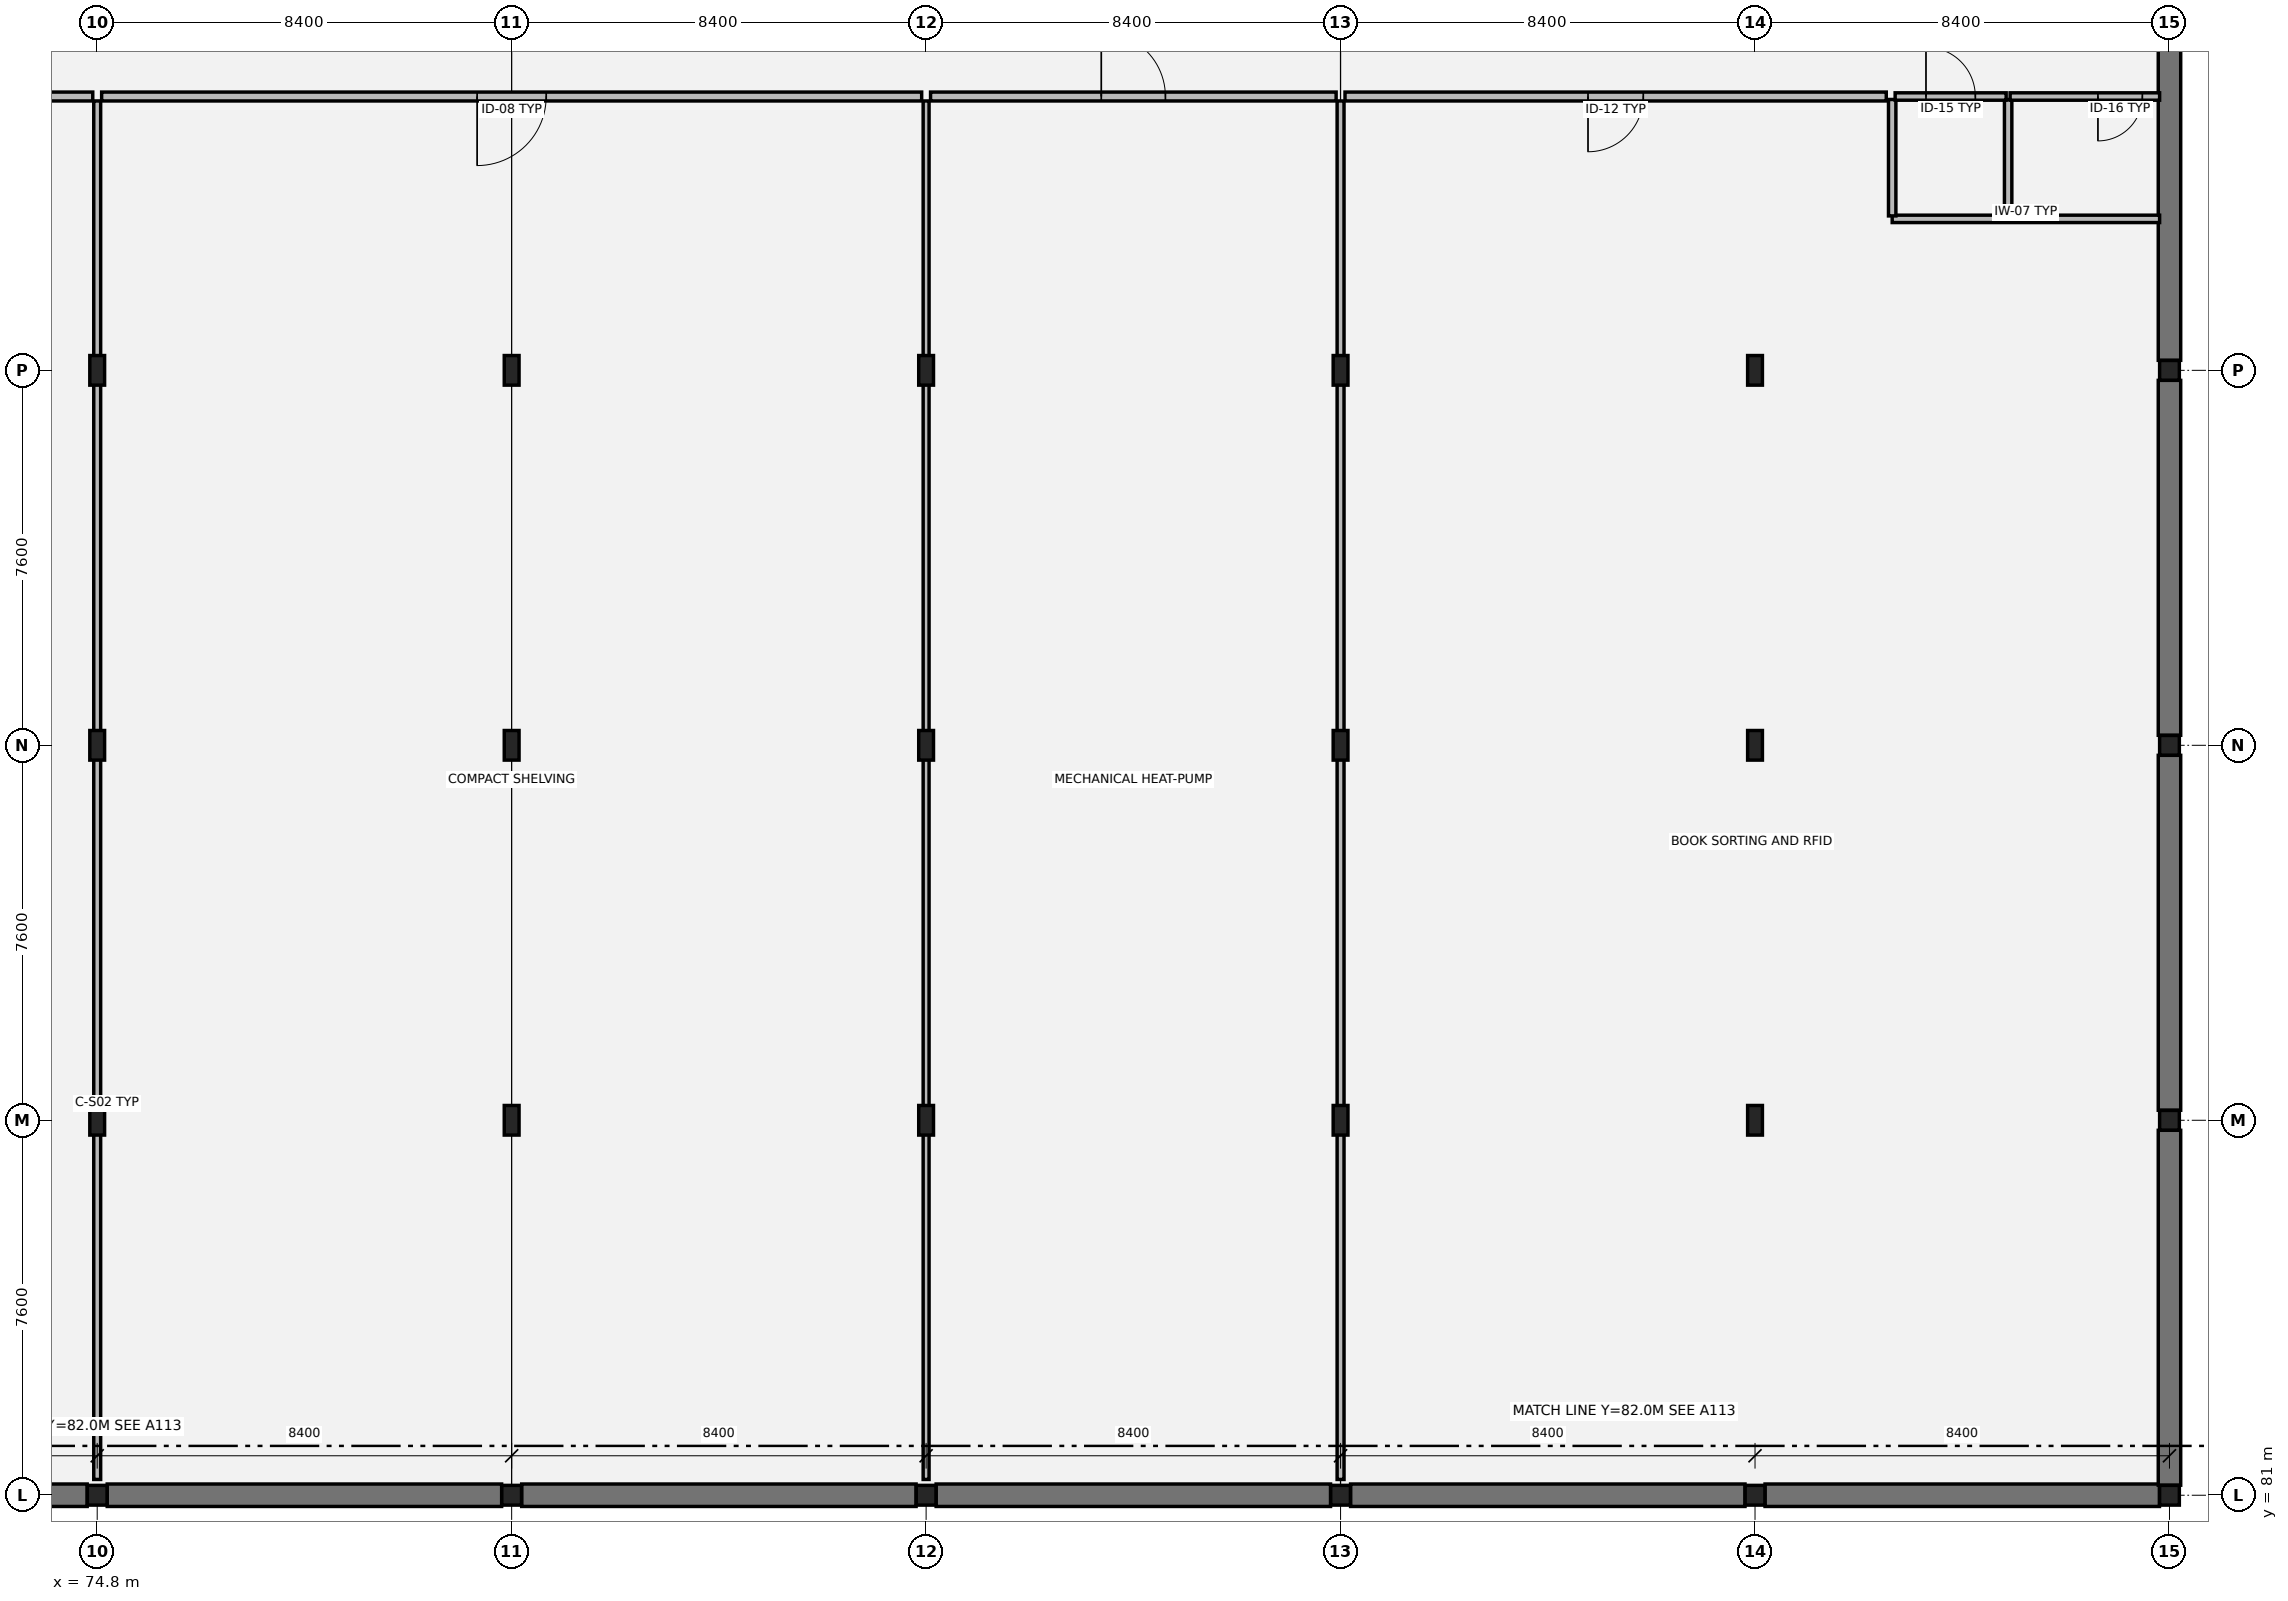
"""IFC4 building model, lengths in metres.
Left out: names, types, materials, properties, quantities, classifications, styles, units other than length and angle.
Written with IfcOpenShell. Run it as: python <this file> out.ifc"""

import sys

from ifc_helpers import new_model, si_unit, direction, frame, frame_2d, origin, origin_2d, place, context, subcontext, project, spatial, rectangle, hollow_rectangle, i_section, extrude, element, fill, save


model = new_model("IFC4")
c1 = context("Model", 3, precision=1e-05, world=origin(), true_north=direction((0.0, 1.0)))
c2 = subcontext(c1, "Body", "Model", "MODEL_VIEW")
j1 = project(units=[si_unit("LENGTHUNIT", "METRE"), si_unit("PLANEANGLEUNIT", "RADIAN")], contexts=[c1])
p1 = place(None, origin())
s1 = spatial("IfcSite", under=j1, at=p1, CompositionType="ELEMENT")
p2 = place(p1, origin())
s2 = spatial("IfcBuilding", under=s1, at=p2, CompositionType="ELEMENT")
p3 = place(p2, frame((0.0, 0.0, -4.42)))
s3 = spatial("IfcBuildingStorey", under=s2, at=p3, CompositionType="ELEMENT", Elevation=-4.42)
p4 = place(p3, frame((74.8, 81.0, 0.0), z_axis=(0.0, 0.0, 1.0), x_axis=(1.0, 0.0, 0.0)))
e1 = element("IfcColumn", 1, at=p4, inside=s3, PredefinedType="COLUMN", context=c2, shape_type="SweptSolid", body=[
    extrude(hollow_rectangle(XDim=0.4, YDim=0.4, WallThickness=0.016, at=origin_2d()), origin(), (0.0, 0.0, 1.0), 4.395),
])
for number, where, z_axis, x_axis in (
    (2, (74.8, 88.6, 0.0), (0.0, 0.0, 1.0), (1.0, 0.0, 0.0)),
    (3, (74.8, 96.2, 0.0), (0.0, 0.0, 1.0), (1.0, 0.0, 0.0)),
    (4, (74.8, 103.8, 0.0), (0.0, 0.0, 1.0), (1.0, 0.0, 0.0)),
):
    element("IfcColumn", number, at=place(p3, frame(where, z_axis=z_axis, x_axis=x_axis)), inside=s3, PredefinedType="COLUMN", context=c2, shape_type="SweptSolid", body=[
        extrude(i_section(OverallWidth=0.3, OverallDepth=0.6, WebThickness=0.015, FlangeThickness=0.03, at=origin_2d()), origin(), (0.0, 0.0, 1.0), 4.395),
    ])
p5 = place(p3, frame((83.2, 81.0, 0.0), z_axis=(0.0, 0.0, 1.0), x_axis=(1.0, 0.0, 0.0)))
e5 = element("IfcColumn", 5, at=p5, inside=s3, PredefinedType="COLUMN", context=c2, shape_type="SweptSolid", body=[
    extrude(hollow_rectangle(XDim=0.4, YDim=0.4, WallThickness=0.016, at=origin_2d()), origin(), (0.0, 0.0, 1.0), 4.395),
])
for number, where, z_axis, x_axis in (
    (6, (83.2, 88.6, 0.0), (0.0, 0.0, 1.0), (1.0, 0.0, 0.0)),
    (7, (83.2, 96.2, 0.0), (0.0, 0.0, 1.0), (1.0, 0.0, 0.0)),
    (8, (83.2, 103.8, 0.0), (0.0, 0.0, 1.0), (1.0, 0.0, 0.0)),
):
    element("IfcColumn", number, at=place(p3, frame(where, z_axis=z_axis, x_axis=x_axis)), inside=s3, PredefinedType="COLUMN", context=c2, shape_type="SweptSolid", body=[
        extrude(i_section(OverallWidth=0.3, OverallDepth=0.6, WebThickness=0.015, FlangeThickness=0.03, at=origin_2d()), origin(), (0.0, 0.0, 1.0), 4.395),
    ])
p6 = place(p3, frame((91.6, 81.0, 0.0), z_axis=(0.0, 0.0, 1.0), x_axis=(1.0, 0.0, 0.0)))
e9 = element("IfcColumn", 9, at=p6, inside=s3, PredefinedType="COLUMN", context=c2, shape_type="SweptSolid", body=[
    extrude(hollow_rectangle(XDim=0.4, YDim=0.4, WallThickness=0.016, at=origin_2d()), origin(), (0.0, 0.0, 1.0), 4.395),
])
for number, where, z_axis, x_axis in (
    (10, (91.6, 88.6, 0.0), (0.0, 0.0, 1.0), (1.0, 0.0, 0.0)),
    (11, (91.6, 96.2, 0.0), (0.0, 0.0, 1.0), (1.0, 0.0, 0.0)),
    (12, (91.6, 103.8, 0.0), (0.0, 0.0, 1.0), (1.0, 0.0, 0.0)),
):
    element("IfcColumn", number, at=place(p3, frame(where, z_axis=z_axis, x_axis=x_axis)), inside=s3, PredefinedType="COLUMN", context=c2, shape_type="SweptSolid", body=[
        extrude(i_section(OverallWidth=0.3, OverallDepth=0.6, WebThickness=0.015, FlangeThickness=0.03, at=origin_2d()), origin(), (0.0, 0.0, 1.0), 4.395),
    ])
p7 = place(p3, frame((100.0, 81.0, 0.0), z_axis=(0.0, 0.0, 1.0), x_axis=(1.0, 0.0, 0.0)))
e13 = element("IfcColumn", 13, at=p7, inside=s3, PredefinedType="COLUMN", context=c2, shape_type="SweptSolid", body=[
    extrude(hollow_rectangle(XDim=0.4, YDim=0.4, WallThickness=0.016, at=origin_2d()), origin(), (0.0, 0.0, 1.0), 4.395),
])
for number, where, z_axis, x_axis in (
    (14, (100.0, 88.6, 0.0), (0.0, 0.0, 1.0), (1.0, 0.0, 0.0)),
    (15, (100.0, 96.2, 0.0), (0.0, 0.0, 1.0), (1.0, 0.0, 0.0)),
    (16, (100.0, 103.8, 0.0), (0.0, 0.0, 1.0), (1.0, 0.0, 0.0)),
):
    element("IfcColumn", number, at=place(p3, frame(where, z_axis=z_axis, x_axis=x_axis)), inside=s3, PredefinedType="COLUMN", context=c2, shape_type="SweptSolid", body=[
        extrude(i_section(OverallWidth=0.3, OverallDepth=0.6, WebThickness=0.015, FlangeThickness=0.03, at=origin_2d()), origin(), (0.0, 0.0, 1.0), 4.395),
    ])
p8 = place(p3, frame((108.4, 81.0, 0.0), z_axis=(0.0, 0.0, 1.0), x_axis=(1.0, 0.0, 0.0)))
e17 = element("IfcColumn", 17, at=p8, inside=s3, PredefinedType="COLUMN", context=c2, shape_type="SweptSolid", body=[
    extrude(hollow_rectangle(XDim=0.4, YDim=0.4, WallThickness=0.016, at=origin_2d()), origin(), (0.0, 0.0, 1.0), 4.395),
])
for number, where, z_axis, x_axis in (
    (18, (108.4, 88.6, 0.0), (0.0, 0.0, 1.0), (1.0, 0.0, 0.0)),
    (19, (108.4, 96.2, 0.0), (0.0, 0.0, 1.0), (1.0, 0.0, 0.0)),
    (20, (108.4, 103.8, 0.0), (0.0, 0.0, 1.0), (1.0, 0.0, 0.0)),
):
    element("IfcColumn", number, at=place(p3, frame(where, z_axis=z_axis, x_axis=x_axis)), inside=s3, PredefinedType="COLUMN", context=c2, shape_type="SweptSolid", body=[
        extrude(i_section(OverallWidth=0.3, OverallDepth=0.6, WebThickness=0.015, FlangeThickness=0.03, at=origin_2d()), origin(), (0.0, 0.0, 1.0), 4.395),
    ])
for number, where, z_axis, x_axis in (
    (21, (116.8, 81.0, 0.0), (0.0, 0.0, 1.0), (1.0, 0.0, 0.0)),
    (22, (116.8, 88.6, 0.0), (0.0, 0.0, 1.0), (1.0, 0.0, 0.0)),
    (23, (116.8, 96.2, 0.0), (0.0, 0.0, 1.0), (1.0, 0.0, 0.0)),
    (24, (116.8, 103.8, 0.0), (0.0, 0.0, 1.0), (1.0, 0.0, 0.0)),
):
    element("IfcColumn", number, at=place(p3, frame(where, z_axis=z_axis, x_axis=x_axis)), inside=s3, PredefinedType="COLUMN", context=c2, shape_type="SweptSolid", body=[
        extrude(hollow_rectangle(XDim=0.4, YDim=0.4, WallThickness=0.016, at=origin_2d()), origin(), (0.0, 0.0, 1.0), 4.395),
    ])
p9 = place(p3, frame((66.603, 81.0, 0.0), z_axis=(0.0, 0.0, 1.0), x_axis=(1.0, 0.0, 0.0)))
e25 = element("IfcWall", 25, at=p9, inside=s3, PredefinedType="USERDEFINED", context=c2, shape_type="SweptSolid", body=[
    extrude(rectangle(XDim=7.994, YDim=0.455, at=frame_2d((3.997, 0.0))), origin(), (0.0, 0.0, 1.0), 3.82),
])
p10 = place(p3, frame((75.003, 81.0, 0.0), z_axis=(0.0, 0.0, 1.0), x_axis=(1.0, 0.0, 0.0)))
e26 = element("IfcWall", 26, at=p10, inside=s3, PredefinedType="USERDEFINED", context=c2, shape_type="SweptSolid", body=[
    extrude(rectangle(XDim=7.994, YDim=0.455, at=frame_2d((3.997, 0.0))), origin(), (0.0, 0.0, 1.0), 3.82),
])
p11 = place(p3, frame((83.403, 81.0, 0.0), z_axis=(0.0, 0.0, 1.0), x_axis=(1.0, 0.0, 0.0)))
e27 = element("IfcWall", 27, at=p11, inside=s3, PredefinedType="USERDEFINED", context=c2, shape_type="SweptSolid", body=[
    extrude(rectangle(XDim=7.994, YDim=0.455, at=frame_2d((3.997, 0.0))), origin(), (0.0, 0.0, 1.0), 3.82),
])
for number, where, z_axis, x_axis in (
    (28, (91.803, 81.0, 0.0), (0.0, 0.0, 1.0), (1.0, 0.0, 0.0)),
    (29, (100.203, 81.0, 0.0), (0.0, 0.0, 1.0), (1.0, 0.0, 0.0)),
):
    element("IfcWall", number, at=place(p3, frame(where, z_axis=z_axis, x_axis=x_axis)), inside=s3, PredefinedType="USERDEFINED", context=c2, shape_type="SweptSolid", body=[
        extrude(rectangle(XDim=7.994, YDim=0.455, at=frame_2d((3.997, 0.0))), origin(), (0.0, 0.0, 1.0), 3.82),
    ])
p12 = place(p3, frame((108.603, 81.0, 0.0), z_axis=(0.0, 0.0, 1.0), x_axis=(1.0, 0.0, 0.0)))
e30 = element("IfcWall", 30, at=p12, inside=s3, PredefinedType="USERDEFINED", context=c2, shape_type="SweptSolid", body=[
    extrude(rectangle(XDim=7.994, YDim=0.455, at=frame_2d((3.997, 0.0))), origin(), (0.0, 0.0, 1.0), 3.82),
])
for number, where, z_axis, x_axis in (
    (31, (116.8, 81.203, 0.0), (0.0, 0.0, 1.0), (0.0, 1.0, 0.0)),
    (32, (116.8, 88.803, 0.0), (0.0, 0.0, 1.0), (0.0, 1.0, 0.0)),
):
    element("IfcWall", number, at=place(p3, frame(where, z_axis=z_axis, x_axis=x_axis)), inside=s3, PredefinedType="USERDEFINED", context=c2, shape_type="SweptSolid", body=[
        extrude(rectangle(XDim=7.194, YDim=0.455, at=frame_2d((3.597, 0.0))), origin(), (0.0, 0.0, 1.0), 3.82),
    ])
p13 = place(p3, frame((116.8, 96.403, 0.0), z_axis=(0.0, 0.0, 1.0), x_axis=(0.0, 1.0, 0.0)))
e33 = element("IfcWall", 33, at=p13, inside=s3, PredefinedType="USERDEFINED", context=c2, shape_type="SweptSolid", body=[
    extrude(rectangle(XDim=7.194, YDim=0.455, at=frame_2d((3.597, 0.0))), origin(), (0.0, 0.0, 1.0), 3.82),
])
p14 = place(p3, frame((116.8, 104.003, 0.0), z_axis=(0.0, 0.0, 1.0), x_axis=(0.0, 1.0, 0.0)))
e34 = element("IfcWall", 34, at=p14, inside=s3, PredefinedType="USERDEFINED", context=c2, shape_type="SweptSolid", body=[
    extrude(rectangle(XDim=7.194, YDim=0.455, at=frame_2d((3.597, 0.0))), origin(), (0.0, 0.0, 1.0), 3.82),
])
p15 = place(p3, frame((111.18, 106.87, 0.0), z_axis=(0.0, 0.0, 1.0), x_axis=(1.0, 0.0, 0.0)))
e35 = element("IfcWall", 35, at=p15, inside=s3, PredefinedType="PARTITIONING", context=c2, shape_type="SweptSolid", body=[
    extrude(rectangle(XDim=5.42, YDim=0.15, at=frame_2d((2.71, 0.0))), origin(), (0.0, 0.0, 1.0), 3.52),
])
for number, where, z_axis, x_axis in (
    (36, (111.18, 106.93, 0.0), (0.0, 0.0, 1.0), (0.0, 1.0, 0.0)),
    (37, (113.53, 106.93, 0.0), (0.0, 0.0, 1.0), (0.0, 1.0, 0.0)),
):
    element("IfcWall", number, at=place(p3, frame(where, z_axis=z_axis, x_axis=x_axis)), inside=s3, PredefinedType="PARTITIONING", context=c2, shape_type="SweptSolid", body=[
        extrude(rectangle(XDim=2.36, YDim=0.15, at=frame_2d((1.18, 0.0))), origin(), (0.0, 0.0, 1.0), 3.52),
    ])
p16 = place(p3, frame((111.24, 109.35, 0.0), z_axis=(0.0, 0.0, 1.0), x_axis=(1.0, 0.0, 0.0)))
e38 = element("IfcWall", 38, at=p16, inside=s3, PredefinedType="PARTITIONING", context=c2, shape_type="SweptSolid", body=[
    extrude(rectangle(XDim=2.25, YDim=0.15, at=frame_2d((1.125, 0.0))), origin(), (0.0, 0.0, 1.0), 3.52),
])
p17 = place(p16, frame((0.625, 0.0, 0.0)))
e39 = element("IfcOpeningElement", 39, at=p17, cuts=e38, PredefinedType="OPENING", context=c2, shape_type="SweptSolid", body=[
    extrude(rectangle(XDim=1.0, YDim=2.15, at=frame_2d((0.5, 1.075))), frame((0.0, 0.085, 0.0), z_axis=(0.0, -1.0, 0.0), x_axis=(1.0, 0.0, 0.0)), (0.0, 0.0, 1.0), 0.17),
])
p18 = place(p3, frame((113.57, 109.35, 0.0), z_axis=(0.0, 0.0, 1.0), x_axis=(1.0, 0.0, 0.0)))
e40 = element("IfcWall", 40, at=p18, inside=s3, PredefinedType="PARTITIONING", context=c2, shape_type="SweptSolid", body=[
    extrude(rectangle(XDim=3.03, YDim=0.15, at=frame_2d((1.515, 0.0))), origin(), (0.0, 0.0, 1.0), 3.52),
])
p19 = place(p18, frame((1.78, 0.0, 0.0)))
e41 = element("IfcOpeningElement", 41, at=p19, cuts=e40, PredefinedType="OPENING", context=c2, shape_type="SweptSolid", body=[
    extrude(rectangle(XDim=0.9, YDim=2.15, at=frame_2d((0.45, 1.075))), frame((0.0, 0.085, 0.0), z_axis=(0.0, -1.0, 0.0), x_axis=(1.0, 0.0, 0.0)), (0.0, 0.0, 1.0), 0.17),
])
p20 = place(p3, frame((66.6, 109.35, 0.0), z_axis=(0.0, 0.0, 1.0), x_axis=(1.0, 0.0, 0.0)))
e42 = element("IfcWall", 42, at=p20, inside=s3, PredefinedType="PARTITIONING", context=c2, shape_type="SweptSolid", body=[
    extrude(rectangle(XDim=8.11, YDim=0.18, at=frame_2d((4.055, 0.0))), origin(), (0.0, 0.0, 1.0), 3.52),
])
p21 = place(p20, frame((3.405, 0.0, 0.0)))
e43 = element("IfcOpeningElement", 43, at=p21, cuts=e42, PredefinedType="OPENING", context=c2, shape_type="SweptSolid", body=[
    extrude(rectangle(XDim=1.3, YDim=2.2, at=frame_2d((0.65, 1.1))), frame((0.0, 0.1, 0.0), z_axis=(0.0, -1.0, 0.0), x_axis=(1.0, 0.0, 0.0)), (0.0, 0.0, 1.0), 0.2),
])
p22 = place(p3, frame((74.89, 109.35, 0.0), z_axis=(0.0, 0.0, 1.0), x_axis=(1.0, 0.0, 0.0)))
e44 = element("IfcWall", 44, at=p22, inside=s3, PredefinedType="PARTITIONING", context=c2, shape_type="SweptSolid", body=[
    extrude(rectangle(XDim=16.62, YDim=0.18, at=frame_2d((8.31, 0.0))), origin(), (0.0, 0.0, 1.0), 3.52),
])
p23 = place(p22, frame((7.61, 0.0, 0.0)))
e45 = element("IfcOpeningElement", 45, at=p23, cuts=e44, PredefinedType="OPENING", context=c2, shape_type="SweptSolid", body=[
    extrude(rectangle(XDim=1.4, YDim=2.22, at=frame_2d((0.7, 1.11))), frame((0.0, 0.1, 0.0), z_axis=(0.0, -1.0, 0.0), x_axis=(1.0, 0.0, 0.0)), (0.0, 0.0, 1.0), 0.2),
])
p24 = place(p3, frame((91.69, 109.35, 0.0), z_axis=(0.0, 0.0, 1.0), x_axis=(1.0, 0.0, 0.0)))
e46 = element("IfcWall", 46, at=p24, inside=s3, PredefinedType="PARTITIONING", context=c2, shape_type="SweptSolid", body=[
    extrude(rectangle(XDim=8.22, YDim=0.18, at=frame_2d((4.11, 0.0))), origin(), (0.0, 0.0, 1.0), 3.52),
])
p25 = place(p24, frame((3.46, 0.0, 0.0)))
e47 = element("IfcOpeningElement", 47, at=p25, cuts=e46, PredefinedType="OPENING", context=c2, shape_type="SweptSolid", body=[
    extrude(rectangle(XDim=1.3, YDim=2.2, at=frame_2d((0.65, 1.1))), frame((0.0, 0.1, 0.0), z_axis=(0.0, -1.0, 0.0), x_axis=(1.0, 0.0, 0.0)), (0.0, 0.0, 1.0), 0.2),
])
p26 = place(p3, frame((100.09, 109.35, 0.0), z_axis=(0.0, 0.0, 1.0), x_axis=(1.0, 0.0, 0.0)))
e48 = element("IfcWall", 48, at=p26, inside=s3, PredefinedType="PARTITIONING", context=c2, shape_type="SweptSolid", body=[
    extrude(rectangle(XDim=10.97, YDim=0.18, at=frame_2d((5.485, 0.0))), origin(), (0.0, 0.0, 1.0), 3.52),
])
p27 = place(p26, frame((4.925, 0.0, 0.0)))
e49 = element("IfcOpeningElement", 49, at=p27, cuts=e48, PredefinedType="OPENING", context=c2, shape_type="SweptSolid", body=[
    extrude(rectangle(XDim=1.12, YDim=2.15, at=frame_2d((0.56, 1.075))), frame((0.0, 0.1, 0.0), z_axis=(0.0, -1.0, 0.0), x_axis=(1.0, 0.0, 0.0)), (0.0, 0.0, 1.0), 0.2),
])
p28 = place(p3, frame((74.8, 81.32, 0.0), z_axis=(0.0, 0.0, 1.0), x_axis=(0.0, 1.0, 0.0)))
e50 = element("IfcWall", 50, at=p28, inside=s3, PredefinedType="PARTITIONING", context=c2, shape_type="SweptSolid", body=[
    extrude(rectangle(XDim=27.94, YDim=0.14, at=frame_2d((13.97, 0.0))), origin(), (0.0, 0.0, 1.0), 3.52),
])
p29 = place(p3, frame((91.6, 81.32, 0.0), z_axis=(0.0, 0.0, 1.0), x_axis=(0.0, 1.0, 0.0)))
e51 = element("IfcWall", 51, at=p29, inside=s3, PredefinedType="PARTITIONING", context=c2, shape_type="SweptSolid", body=[
    extrude(rectangle(XDim=27.94, YDim=0.12, at=frame_2d((13.97, 0.0))), origin(), (0.0, 0.0, 1.0), 3.52),
])
p30 = place(p3, frame((100.0, 81.32, 0.0), z_axis=(0.0, 0.0, 1.0), x_axis=(0.0, 1.0, 0.0)))
e52 = element("IfcWall", 52, at=p30, inside=s3, PredefinedType="PARTITIONING", context=c2, shape_type="SweptSolid", body=[
    extrude(rectangle(XDim=27.94, YDim=0.14, at=frame_2d((13.97, 0.0))), origin(), (0.0, 0.0, 1.0), 3.52),
])
p31 = place(p17, origin())
e53 = element("IfcDoor", 53, at=p31, inside=s3, OperationType="SINGLE_SWING_LEFT", PredefinedType="DOOR", context=c2, shape_type="SweptSolid", body=[
    extrude(rectangle(XDim=1.0, YDim=2.15, at=frame_2d((0.5, 1.075))), frame((0.0, 0.025, 0.0), z_axis=(0.0, -1.0, 0.0), x_axis=(1.0, 0.0, 0.0)), (0.0, 0.0, 1.0), 0.05),
])
fill(e39, e53)
p32 = place(p19, origin())
e54 = element("IfcDoor", 54, at=p32, inside=s3, OperationType="SINGLE_SWING_RIGHT", PredefinedType="DOOR", context=c2, shape_type="SweptSolid", body=[
    extrude(rectangle(XDim=0.9, YDim=2.15, at=frame_2d((0.45, 1.075))), frame((0.0, 0.025, 0.0), z_axis=(0.0, -1.0, 0.0), x_axis=(1.0, 0.0, 0.0)), (0.0, 0.0, 1.0), 0.05),
])
fill(e41, e54)
p33 = place(p23, origin())
e55 = element("IfcDoor", 55, at=p33, inside=s3, OperationType="SINGLE_SWING_RIGHT", PredefinedType="DOOR", context=c2, shape_type="SweptSolid", body=[
    extrude(rectangle(XDim=1.4, YDim=2.22, at=frame_2d((0.7, 1.11))), frame((0.0, 0.025, 0.0), z_axis=(0.0, -1.0, 0.0), x_axis=(1.0, 0.0, 0.0)), (0.0, 0.0, 1.0), 0.05),
])
fill(e45, e55)
p34 = place(p25, origin())
e56 = element("IfcDoor", 56, at=p34, inside=s3, OperationType="SINGLE_SWING_LEFT", PredefinedType="DOOR", context=c2, shape_type="SweptSolid", body=[
    extrude(rectangle(XDim=1.3, YDim=2.2, at=frame_2d((0.65, 1.1))), frame((0.0, 0.025, 0.0), z_axis=(0.0, -1.0, 0.0), x_axis=(1.0, 0.0, 0.0)), (0.0, 0.0, 1.0), 0.05),
])
fill(e47, e56)
p35 = place(p27, origin())
e57 = element("IfcDoor", 57, at=p35, inside=s3, OperationType="SINGLE_SWING_RIGHT", PredefinedType="DOOR", context=c2, shape_type="SweptSolid", body=[
    extrude(rectangle(XDim=1.12, YDim=2.15, at=frame_2d((0.56, 1.075))), frame((0.0, 0.025, 0.0), z_axis=(0.0, -1.0, 0.0), x_axis=(1.0, 0.0, 0.0)), (0.0, 0.0, 1.0), 0.05),
])
fill(e49, e57)
save(model, sys.argv[1])
